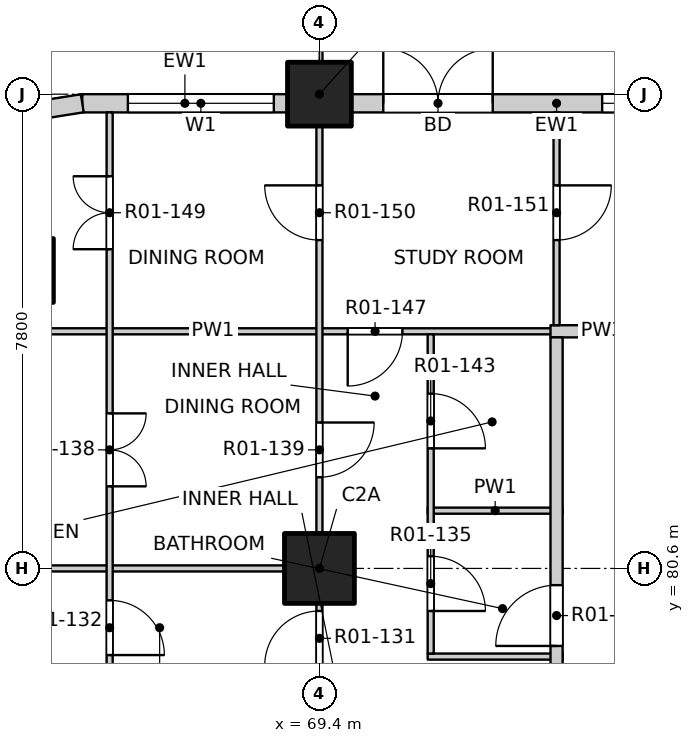
"""IFC4 building model, lengths in metres.
Left out: names, types, materials, properties, quantities, classifications, styles, units other than length and angle.
Written with IfcOpenShell. Run it as: python <this file> out.ifc"""

import sys

from ifc_helpers import new_model, si_unit, direction, frame, frame_2d, origin, origin_2d, place, context, subcontext, project, spatial, rectangle, extrude, element, fill, save


model = new_model("IFC4")
c1 = context("Model", 3, precision=1e-05, world=origin(), true_north=direction((0.0, 1.0)))
c2 = subcontext(c1, "Body", "Model", "MODEL_VIEW")
j1 = project(units=[si_unit("LENGTHUNIT", "METRE"), si_unit("PLANEANGLEUNIT", "RADIAN")], contexts=[c1])
p1 = place(None, origin())
s1 = spatial("IfcSite", under=j1, at=p1, CompositionType="ELEMENT")
p2 = place(p1, origin())
s2 = spatial("IfcBuilding", under=s1, at=p2, CompositionType="ELEMENT")
p3 = place(p2, frame((0.0, 0.0, 26.3)))
s3 = spatial("IfcBuildingStorey", under=s2, at=p3, CompositionType="ELEMENT", Elevation=26.3)
for number, where, z_axis, x_axis in (
    (1, (64.5, 85.5, -0.25), (0.0, 0.0, 1.0), (1.0, 0.0, 0.0)),
    (2, (69.4, 88.4, -0.25), (0.0, 0.0, 1.0), (1.0, 0.0, 0.0)),
):
    element("IfcColumn", number, at=place(p3, frame(where, z_axis=z_axis, x_axis=x_axis)), inside=s3, PredefinedType="COLUMN", context=c2, shape_type="SweptSolid", body=[
        extrude(rectangle(XDim=1.05, YDim=1.05, at=origin_2d()), origin(), (0.0, 0.0, 1.0), 3.4),
    ])
p4 = place(p3, frame((69.4, 80.6, -0.25), z_axis=(0.0, 0.0, 1.0), x_axis=(1.0, 0.0, 0.0)))
e3 = element("IfcColumn", 3, at=p4, inside=s3, PredefinedType="COLUMN", context=c2, shape_type="SweptSolid", body=[
    extrude(rectangle(XDim=1.15, YDim=1.15, at=origin_2d()), origin(), (0.0, 0.0, 1.0), 3.4),
])
p5 = place(p3, frame((65.5, 88.25, 0.0), z_axis=(0.0, 0.0, 1.0), x_axis=(1.0, 0.0, 0.0)))
e4 = element("IfcWall", 4, at=p5, inside=s3, PredefinedType="SOLIDWALL", context=c2, shape_type="SweptSolid", body=[
    extrude(rectangle(XDim=3.375, YDim=0.3, at=frame_2d((1.688, 0.0))), origin(), (0.0, 0.0, 1.0), 2.7),
])
p6 = place(p5, frame((0.75, 0.0, 0.9)))
e5 = element("IfcOpeningElement", 5, at=p6, cuts=e4, PredefinedType="OPENING", context=c2, shape_type="SweptSolid", body=[
    extrude(rectangle(XDim=2.4, YDim=1.8, at=frame_2d((1.2, 0.9))), frame((0.0, 0.16, 0.0), z_axis=(0.0, -1.0, 0.0), x_axis=(1.0, 0.0, 0.0)), (0.0, 0.0, 1.0), 0.32),
])
p7 = place(p3, frame((69.925, 88.25, 0.0), z_axis=(0.0, 0.0, 1.0), x_axis=(1.0, 0.0, 0.0)))
e6 = element("IfcWall", 6, at=p7, inside=s3, PredefinedType="SOLIDWALL", context=c2, shape_type="SweptSolid", body=[
    extrude(rectangle(XDim=6.75, YDim=0.3, at=frame_2d((3.375, 0.0))), origin(), (0.0, 0.0, 1.0), 2.7),
])
p8 = place(p7, frame((0.525, 0.0, 0.0)))
e7 = element("IfcOpeningElement", 7, at=p8, cuts=e6, PredefinedType="OPENING", context=c2, shape_type="SweptSolid", body=[
    extrude(rectangle(XDim=1.8, YDim=2.4, at=frame_2d((0.9, 1.2))), frame((0.0, 0.16, 0.0), z_axis=(0.0, -1.0, 0.0), x_axis=(1.0, 0.0, 0.0)), (0.0, 0.0, 1.0), 0.32),
])
p9 = place(p7, frame((4.125, 0.0, 0.9)))
e8 = element("IfcOpeningElement", 8, at=p9, cuts=e6, PredefinedType="OPENING", context=c2, shape_type="SweptSolid", body=[
    extrude(rectangle(XDim=2.4, YDim=1.8, at=frame_2d((1.2, 0.9))), frame((0.0, 0.16, 0.0), z_axis=(0.0, -1.0, 0.0), x_axis=(1.0, 0.0, 0.0)), (0.0, 0.0, 1.0), 0.32),
])
p10 = place(p3, frame((65.5, 88.25, 0.0), z_axis=(0.0, 0.0, 1.0), x_axis=(-0.987678452879, -0.156496880861, 0.0)))
e9 = element("IfcWall", 9, at=p10, inside=s3, PredefinedType="SOLIDWALL", context=c2, shape_type="SweptSolid", body=[
    extrude(rectangle(XDim=1.173, YDim=0.3, at=frame_2d((0.586, 0.0))), origin(), (0.0, 0.0, 1.0), 2.7),
])
p11 = place(p3, frame((71.18, 79.15, 0.0), z_axis=(0.0, 0.0, 1.0), x_axis=(1.0, 0.0, 0.0)))
e10 = element("IfcWall", 10, at=p11, inside=s3, PredefinedType="PARTITIONING", context=c2, shape_type="SweptSolid", body=[
    extrude(rectangle(XDim=2.22, YDim=0.1, at=frame_2d((1.11, 0.0))), origin(), (0.0, 0.0, 1.0), 3.15),
])
p12 = place(p3, frame((61.9, 80.6, 0.0), z_axis=(0.0, 0.0, 1.0), x_axis=(1.0, 0.0, 0.0)))
e11 = element("IfcWall", 11, at=p12, inside=s3, PredefinedType="PARTITIONING", context=c2, shape_type="SweptSolid", body=[
    extrude(rectangle(XDim=7.55, YDim=0.1, at=frame_2d((3.775, 0.0))), origin(), (0.0, 0.0, 1.0), 2.55),
])
p13 = place(p3, frame((71.18, 81.55, 0.0), z_axis=(0.0, 0.0, 1.0), x_axis=(1.0, 0.0, 0.0)))
e12 = element("IfcWall", 12, at=p13, inside=s3, PredefinedType="PARTITIONING", context=c2, shape_type="SweptSolid", body=[
    extrude(rectangle(XDim=2.22, YDim=0.1, at=frame_2d((1.11, 0.0))), origin(), (0.0, 0.0, 1.0), 3.15),
])
p14 = place(p3, frame((61.9, 84.5, 0.0), z_axis=(0.0, 0.0, 1.0), x_axis=(1.0, 0.0, 0.0)))
e13 = element("IfcWall", 13, at=p14, inside=s3, PredefinedType="PARTITIONING", context=c2, shape_type="SweptSolid", body=[
    extrude(rectangle(XDim=11.5, YDim=0.1, at=frame_2d((5.75, 0.0))), origin(), (0.0, 0.0, 1.0), 3.15),
])
p15 = place(p14, frame((7.965, 0.0, 0.0)))
e14 = element("IfcOpeningElement", 14, at=p15, cuts=e13, PredefinedType="OPENING", context=c2, shape_type="SweptSolid", body=[
    extrude(rectangle(XDim=0.9, YDim=2.1, at=frame_2d((0.45, 1.05))), frame((0.0, 0.06, 0.0), z_axis=(0.0, -1.0, 0.0), x_axis=(1.0, 0.0, 0.0)), (0.0, 0.0, 1.0), 0.12),
])
p16 = place(p3, frame((73.2, 84.5, 0.0), z_axis=(0.0, 0.0, 1.0), x_axis=(1.0, 0.0, 0.0)))
e15 = element("IfcWall", 15, at=p16, inside=s3, PredefinedType="PARTITIONING", context=c2, shape_type="SweptSolid", body=[
    extrude(rectangle(XDim=1.7, YDim=0.2, at=frame_2d((0.85, 0.0))), origin(), (0.0, 0.0, 1.0), 3.15),
])
p17 = place(p3, frame((65.95, 76.8, 0.0), z_axis=(0.0, 0.0, 1.0), x_axis=(0.0, 1.0, 0.0)))
e16 = element("IfcWall", 16, at=p17, inside=s3, PredefinedType="PARTITIONING", context=c2, shape_type="SweptSolid", body=[
    extrude(rectangle(XDim=11.3, YDim=0.1, at=frame_2d((5.65, 0.0))), origin(), (0.0, 0.0, 1.0), 3.15),
])
p18 = place(p17, frame((0.425, 0.0, 0.0)))
e17 = element("IfcOpeningElement", 17, at=p18, cuts=e16, PredefinedType="OPENING", context=c2, shape_type="SweptSolid", body=[
    extrude(rectangle(XDim=0.9, YDim=2.1, at=frame_2d((0.45, 1.05))), frame((0.0, 0.06, 0.0), z_axis=(0.0, -1.0, 0.0), x_axis=(1.0, 0.0, 0.0)), (0.0, 0.0, 1.0), 0.12),
])
p19 = place(p17, frame((2.375, 0.0, 0.0)))
e18 = element("IfcOpeningElement", 18, at=p19, cuts=e16, PredefinedType="OPENING", context=c2, shape_type="SweptSolid", body=[
    extrude(rectangle(XDim=0.9, YDim=2.1, at=frame_2d((0.45, 1.05))), frame((0.0, 0.06, 0.0), z_axis=(0.0, -1.0, 0.0), x_axis=(1.0, 0.0, 0.0)), (0.0, 0.0, 1.0), 0.12),
])
p20 = place(p17, frame((5.15, 0.0, 0.0)))
e19 = element("IfcOpeningElement", 19, at=p20, cuts=e16, PredefinedType="OPENING", context=c2, shape_type="SweptSolid", body=[
    extrude(rectangle(XDim=1.2, YDim=2.1, at=frame_2d((0.6, 1.05))), frame((0.0, 0.06, 0.0), z_axis=(0.0, -1.0, 0.0), x_axis=(1.0, 0.0, 0.0)), (0.0, 0.0, 1.0), 0.12),
])
p21 = place(p17, frame((9.05, 0.0, 0.0)))
e20 = element("IfcOpeningElement", 20, at=p21, cuts=e16, PredefinedType="OPENING", context=c2, shape_type="SweptSolid", body=[
    extrude(rectangle(XDim=1.2, YDim=2.1, at=frame_2d((0.6, 1.05))), frame((0.0, 0.06, 0.0), z_axis=(0.0, -1.0, 0.0), x_axis=(1.0, 0.0, 0.0)), (0.0, 0.0, 1.0), 0.12),
])
p22 = place(p3, frame((69.4, 49.4, 0.0), z_axis=(0.0, 0.0, 1.0), x_axis=(0.0, 1.0, 0.0)))
e21 = element("IfcWall", 21, at=p22, inside=s3, PredefinedType="PARTITIONING", context=c2, shape_type="SweptSolid", body=[
    extrude(rectangle(XDim=31.2, YDim=0.1, at=frame_2d((15.6, 0.0))), origin(), (0.0, 0.0, 1.0), 3.15),
])
p23 = place(p22, frame((1.5, 0.0, 0.0)))
e22 = element("IfcOpeningElement", 22, at=p23, cuts=e21, PredefinedType="OPENING", context=c2, shape_type="SweptSolid", body=[
    extrude(rectangle(XDim=0.9, YDim=2.1, at=frame_2d((0.45, 1.05))), frame((0.0, 0.06, 0.0), z_axis=(0.0, -1.0, 0.0), x_axis=(1.0, 0.0, 0.0)), (0.0, 0.0, 1.0), 0.12),
])
p24 = place(p22, frame((6.225, 0.0, 0.0)))
e23 = element("IfcOpeningElement", 23, at=p24, cuts=e21, PredefinedType="OPENING", context=c2, shape_type="SweptSolid", body=[
    extrude(rectangle(XDim=0.9, YDim=2.1, at=frame_2d((0.45, 1.05))), frame((0.0, 0.06, 0.0), z_axis=(0.0, -1.0, 0.0), x_axis=(1.0, 0.0, 0.0)), (0.0, 0.0, 1.0), 0.12),
])
p25 = place(p22, frame((10.275, 0.0, 0.0)))
e24 = element("IfcOpeningElement", 24, at=p25, cuts=e21, PredefinedType="OPENING", context=c2, shape_type="SweptSolid", body=[
    extrude(rectangle(XDim=0.9, YDim=2.1, at=frame_2d((0.45, 1.05))), frame((0.0, 0.06, 0.0), z_axis=(0.0, -1.0, 0.0), x_axis=(1.0, 0.0, 0.0)), (0.0, 0.0, 1.0), 0.12),
])
p26 = place(p22, frame((13.2, 0.0, 0.0)))
e25 = element("IfcOpeningElement", 25, at=p26, cuts=e21, PredefinedType="OPENING", context=c2, shape_type="SweptSolid", body=[
    extrude(rectangle(XDim=0.9, YDim=2.1, at=frame_2d((0.45, 1.05))), frame((0.0, 0.06, 0.0), z_axis=(0.0, -1.0, 0.0), x_axis=(1.0, 0.0, 0.0)), (0.0, 0.0, 1.0), 0.12),
])
p27 = place(p22, frame((18.075, 0.0, 0.0)))
e26 = element("IfcOpeningElement", 26, at=p27, cuts=e21, PredefinedType="OPENING", context=c2, shape_type="SweptSolid", body=[
    extrude(rectangle(XDim=0.9, YDim=2.1, at=frame_2d((0.45, 1.05))), frame((0.0, 0.06, 0.0), z_axis=(0.0, -1.0, 0.0), x_axis=(1.0, 0.0, 0.0)), (0.0, 0.0, 1.0), 0.12),
])
p28 = place(p22, frame((21.8, 0.0, 0.0)))
e27 = element("IfcOpeningElement", 27, at=p28, cuts=e21, PredefinedType="OPENING", context=c2, shape_type="SweptSolid", body=[
    extrude(rectangle(XDim=0.9, YDim=2.1, at=frame_2d((0.45, 1.05))), frame((0.0, 0.06, 0.0), z_axis=(0.0, -1.0, 0.0), x_axis=(1.0, 0.0, 0.0)), (0.0, 0.0, 1.0), 0.12),
])
p29 = place(p22, frame((24.9, 0.0, 0.0)))
e28 = element("IfcOpeningElement", 28, at=p29, cuts=e21, PredefinedType="OPENING", context=c2, shape_type="SweptSolid", body=[
    extrude(rectangle(XDim=0.9, YDim=2.1, at=frame_2d((0.45, 1.05))), frame((0.0, 0.06, 0.0), z_axis=(0.0, -1.0, 0.0), x_axis=(1.0, 0.0, 0.0)), (0.0, 0.0, 1.0), 0.12),
])
p30 = place(p22, frame((29.6, 0.0, 0.0)))
e29 = element("IfcOpeningElement", 29, at=p30, cuts=e21, PredefinedType="OPENING", context=c2, shape_type="SweptSolid", body=[
    extrude(rectangle(XDim=0.9, YDim=2.1, at=frame_2d((0.45, 1.05))), frame((0.0, 0.06, 0.0), z_axis=(0.0, -1.0, 0.0), x_axis=(1.0, 0.0, 0.0)), (0.0, 0.0, 1.0), 0.12),
])
p31 = place(p3, frame((69.4, 80.6, 0.0), z_axis=(0.0, 0.0, 1.0), x_axis=(0.0, 1.0, 0.0)))
e30 = element("IfcWall", 30, at=p31, inside=s3, PredefinedType="PARTITIONING", context=c2, shape_type="SweptSolid", body=[
    extrude(rectangle(XDim=7.5, YDim=0.1, at=frame_2d((3.75, 0.0))), origin(), (0.0, 0.0, 1.0), 2.55),
])
p32 = place(p31, frame((1.5, 0.0, 0.0)))
e31 = element("IfcOpeningElement", 31, at=p32, cuts=e30, PredefinedType="OPENING", context=c2, shape_type="SweptSolid", body=[
    extrude(rectangle(XDim=0.9, YDim=2.1, at=frame_2d((0.45, 1.05))), frame((0.0, 0.06, 0.0), z_axis=(0.0, -1.0, 0.0), x_axis=(1.0, 0.0, 0.0)), (0.0, 0.0, 1.0), 0.12),
])
p33 = place(p31, frame((5.4, 0.0, 0.0)))
e32 = element("IfcOpeningElement", 32, at=p33, cuts=e30, PredefinedType="OPENING", context=c2, shape_type="SweptSolid", body=[
    extrude(rectangle(XDim=0.9, YDim=2.1, at=frame_2d((0.45, 1.05))), frame((0.0, 0.06, 0.0), z_axis=(0.0, -1.0, 0.0), x_axis=(1.0, 0.0, 0.0)), (0.0, 0.0, 1.0), 0.12),
])
p34 = place(p3, frame((71.23, 79.2, 0.0), z_axis=(0.0, 0.0, 1.0), x_axis=(0.0, 1.0, 0.0)))
e33 = element("IfcWall", 33, at=p34, inside=s3, PredefinedType="PARTITIONING", context=c2, shape_type="SweptSolid", body=[
    extrude(rectangle(XDim=5.25, YDim=0.1, at=frame_2d((2.625, 0.0))), origin(), (0.0, 0.0, 1.0), 3.15),
])
p35 = place(p34, frame((0.7, 0.0, 0.0)))
e34 = element("IfcOpeningElement", 34, at=p35, cuts=e33, PredefinedType="OPENING", context=c2, shape_type="SweptSolid", body=[
    extrude(rectangle(XDim=0.9, YDim=2.1, at=frame_2d((0.45, 1.05))), frame((0.0, 0.06, 0.0), z_axis=(0.0, -1.0, 0.0), x_axis=(1.0, 0.0, 0.0)), (0.0, 0.0, 1.0), 0.12),
])
p36 = place(p34, frame((3.375, 0.0, 0.0)))
e35 = element("IfcOpeningElement", 35, at=p36, cuts=e33, PredefinedType="OPENING", context=c2, shape_type="SweptSolid", body=[
    extrude(rectangle(XDim=0.9, YDim=2.1, at=frame_2d((0.45, 1.05))), frame((0.0, 0.06, 0.0), z_axis=(0.0, -1.0, 0.0), x_axis=(1.0, 0.0, 0.0)), (0.0, 0.0, 1.0), 0.12),
])
p37 = place(p3, frame((73.3, 53.4, 0.0), z_axis=(0.0, 0.0, 1.0), x_axis=(0.0, 1.0, 0.0)))
e36 = element("IfcWall", 36, at=p37, inside=s3, PredefinedType="PARTITIONING", context=c2, shape_type="SweptSolid", body=[
    extrude(rectangle(XDim=31.0, YDim=0.2, at=frame_2d((15.5, 0.0))), origin(), (0.0, 0.0, 1.0), 3.15),
])
p38 = place(p37, frame((2.325, 0.0, 0.0)))
e37 = element("IfcOpeningElement", 37, at=p38, cuts=e36, PredefinedType="OPENING", context=c2, shape_type="SweptSolid", body=[
    extrude(rectangle(XDim=1.0, YDim=2.1, at=frame_2d((0.5, 1.05))), frame((0.0, 0.11, 0.0), z_axis=(0.0, -1.0, 0.0), x_axis=(1.0, 0.0, 0.0)), (0.0, 0.0, 1.0), 0.22),
])
p39 = place(p37, frame((10.725, 0.0, 0.0)))
e38 = element("IfcOpeningElement", 38, at=p39, cuts=e36, PredefinedType="OPENING", context=c2, shape_type="SweptSolid", body=[
    extrude(rectangle(XDim=1.0, YDim=2.1, at=frame_2d((0.5, 1.05))), frame((0.0, 0.11, 0.0), z_axis=(0.0, -1.0, 0.0), x_axis=(1.0, 0.0, 0.0)), (0.0, 0.0, 1.0), 0.22),
])
p40 = place(p37, frame((18.225, 0.0, 0.0)))
e39 = element("IfcOpeningElement", 39, at=p40, cuts=e36, PredefinedType="OPENING", context=c2, shape_type="SweptSolid", body=[
    extrude(rectangle(XDim=1.0, YDim=2.1, at=frame_2d((0.5, 1.05))), frame((0.0, 0.11, 0.0), z_axis=(0.0, -1.0, 0.0), x_axis=(1.0, 0.0, 0.0)), (0.0, 0.0, 1.0), 0.22),
])
p41 = place(p37, frame((25.925, 0.0, 0.0)))
e40 = element("IfcOpeningElement", 40, at=p41, cuts=e36, PredefinedType="OPENING", context=c2, shape_type="SweptSolid", body=[
    extrude(rectangle(XDim=1.0, YDim=2.1, at=frame_2d((0.5, 1.05))), frame((0.0, 0.11, 0.0), z_axis=(0.0, -1.0, 0.0), x_axis=(1.0, 0.0, 0.0)), (0.0, 0.0, 1.0), 0.22),
])
p42 = place(p3, frame((73.3, 84.6, 0.0), z_axis=(0.0, 0.0, 1.0), x_axis=(0.0, 1.0, 0.0)))
e41 = element("IfcWall", 41, at=p42, inside=s3, PredefinedType="PARTITIONING", context=c2, shape_type="SweptSolid", body=[
    extrude(rectangle(XDim=3.5, YDim=0.1, at=frame_2d((1.75, 0.0))), origin(), (0.0, 0.0, 1.0), 3.15),
])
p43 = place(p42, frame((1.4, 0.0, 0.0)))
e42 = element("IfcOpeningElement", 42, at=p43, cuts=e41, PredefinedType="OPENING", context=c2, shape_type="SweptSolid", body=[
    extrude(rectangle(XDim=0.9, YDim=2.1, at=frame_2d((0.45, 1.05))), frame((0.0, 0.06, 0.0), z_axis=(0.0, -1.0, 0.0), x_axis=(1.0, 0.0, 0.0)), (0.0, 0.0, 1.0), 0.12),
])
p44 = place(p6, origin())
e43 = element("IfcWindow", 43, at=p44, inside=s3, PartitioningType="DOUBLE_PANEL_VERTICAL", PredefinedType="WINDOW", context=c2, shape_type="SweptSolid", body=[
    extrude(rectangle(XDim=2.4, YDim=1.8, at=frame_2d((1.2, 0.9))), frame((0.0, 0.03, 0.0), z_axis=(0.0, -1.0, 0.0), x_axis=(1.0, 0.0, 0.0)), (0.0, 0.0, 1.0), 0.06),
])
fill(e5, e43)
p45 = place(p8, origin())
e44 = element("IfcDoor", 44, at=p45, inside=s3, OperationType="DOUBLE_DOOR_SINGLE_SWING", PredefinedType="DOOR", context=c2, shape_type="SweptSolid", body=[
    extrude(rectangle(XDim=1.8, YDim=2.4, at=frame_2d((0.9, 1.2))), frame((0.0, 0.025, 0.0), z_axis=(0.0, -1.0, 0.0), x_axis=(1.0, 0.0, 0.0)), (0.0, 0.0, 1.0), 0.05),
])
fill(e7, e44)
p46 = place(p9, origin())
e45 = element("IfcWindow", 45, at=p46, inside=s3, PartitioningType="DOUBLE_PANEL_VERTICAL", PredefinedType="WINDOW", context=c2, shape_type="SweptSolid", body=[
    extrude(rectangle(XDim=2.4, YDim=1.8, at=frame_2d((1.2, 0.9))), frame((0.0, 0.03, 0.0), z_axis=(0.0, -1.0, 0.0), x_axis=(1.0, 0.0, 0.0)), (0.0, 0.0, 1.0), 0.06),
])
fill(e8, e45)
p47 = place(p30, origin())
e46 = element("IfcDoor", 46, at=p47, inside=s3, OperationType="SINGLE_SWING_LEFT", PredefinedType="DOOR", context=c2, shape_type="SweptSolid", body=[
    extrude(rectangle(XDim=0.9, YDim=2.1, at=frame_2d((0.45, 1.05))), frame((0.0, 0.025, 0.0), z_axis=(0.0, -1.0, 0.0), x_axis=(1.0, 0.0, 0.0)), (0.0, 0.0, 1.0), 0.05),
])
fill(e29, e46)
p48 = place(p19, origin())
e47 = element("IfcDoor", 47, at=p48, inside=s3, OperationType="SINGLE_SWING_RIGHT", PredefinedType="DOOR", context=c2, shape_type="SweptSolid", body=[
    extrude(rectangle(XDim=0.9, YDim=2.1, at=frame_2d((0.45, 1.05))), frame((0.0, 0.025, 0.0), z_axis=(0.0, -1.0, 0.0), x_axis=(1.0, 0.0, 0.0)), (0.0, 0.0, 1.0), 0.05),
])
fill(e18, e47)
p49 = place(p41, origin())
e48 = element("IfcDoor", 48, at=p49, inside=s3, OperationType="SINGLE_SWING_RIGHT", PredefinedType="DOOR", context=c2, shape_type="SweptSolid", body=[
    extrude(rectangle(XDim=1.0, YDim=2.1, at=frame_2d((0.5, 1.05))), frame((0.0, 0.025, 0.0), z_axis=(0.0, -1.0, 0.0), x_axis=(1.0, 0.0, 0.0)), (0.0, 0.0, 1.0), 0.05),
])
fill(e40, e48)
p50 = place(p35, origin())
e49 = element("IfcDoor", 49, at=p50, inside=s3, OperationType="SINGLE_SWING_RIGHT", PredefinedType="DOOR", context=c2, shape_type="SweptSolid", body=[
    extrude(rectangle(XDim=0.9, YDim=2.1, at=frame_2d((0.45, 1.05))), frame((0.0, 0.025, 0.0), z_axis=(0.0, -1.0, 0.0), x_axis=(1.0, 0.0, 0.0)), (0.0, 0.0, 1.0), 0.05),
])
fill(e34, e49)
p51 = place(p20, origin())
e50 = element("IfcDoor", 50, at=p51, inside=s3, OperationType="DOUBLE_DOOR_SINGLE_SWING", PredefinedType="DOOR", context=c2, shape_type="SweptSolid", body=[
    extrude(rectangle(XDim=1.2, YDim=2.1, at=frame_2d((0.6, 1.05))), frame((0.0, 0.025, 0.0), z_axis=(0.0, -1.0, 0.0), x_axis=(1.0, 0.0, 0.0)), (0.0, 0.0, 1.0), 0.05),
])
fill(e19, e50)
p52 = place(p32, origin())
e51 = element("IfcDoor", 51, at=p52, inside=s3, OperationType="SINGLE_SWING_LEFT", PredefinedType="DOOR", context=c2, shape_type="SweptSolid", body=[
    extrude(rectangle(XDim=0.9, YDim=2.1, at=frame_2d((0.45, 1.05))), frame((0.0, 0.025, 0.0), z_axis=(0.0, -1.0, 0.0), x_axis=(1.0, 0.0, 0.0)), (0.0, 0.0, 1.0), 0.05),
])
fill(e31, e51)
p53 = place(p36, origin())
e52 = element("IfcDoor", 52, at=p53, inside=s3, OperationType="SINGLE_SWING_RIGHT", PredefinedType="DOOR", context=c2, shape_type="SweptSolid", body=[
    extrude(rectangle(XDim=0.9, YDim=2.1, at=frame_2d((0.45, 1.05))), frame((0.0, 0.025, 0.0), z_axis=(0.0, -1.0, 0.0), x_axis=(1.0, 0.0, 0.0)), (0.0, 0.0, 1.0), 0.05),
])
fill(e35, e52)
p54 = place(p15, origin())
e53 = element("IfcDoor", 53, at=p54, inside=s3, OperationType="SINGLE_SWING_RIGHT", PredefinedType="DOOR", context=c2, shape_type="SweptSolid", body=[
    extrude(rectangle(XDim=0.9, YDim=2.1, at=frame_2d((0.45, 1.05))), frame((0.0, 0.025, 0.0), z_axis=(0.0, -1.0, 0.0), x_axis=(1.0, 0.0, 0.0)), (0.0, 0.0, 1.0), 0.05),
])
fill(e14, e53)
p55 = place(p21, origin())
e54 = element("IfcDoor", 54, at=p55, inside=s3, OperationType="DOUBLE_DOOR_SINGLE_SWING", PredefinedType="DOOR", context=c2, shape_type="SweptSolid", body=[
    extrude(rectangle(XDim=1.2, YDim=2.1, at=frame_2d((0.6, 1.05))), frame((0.0, 0.025, 0.0), z_axis=(0.0, -1.0, 0.0), x_axis=(1.0, 0.0, 0.0)), (0.0, 0.0, 1.0), 0.05),
])
fill(e20, e54)
p56 = place(p33, origin())
e55 = element("IfcDoor", 55, at=p56, inside=s3, OperationType="SINGLE_SWING_RIGHT", PredefinedType="DOOR", context=c2, shape_type="SweptSolid", body=[
    extrude(rectangle(XDim=0.9, YDim=2.1, at=frame_2d((0.45, 1.05))), frame((0.0, 0.025, 0.0), z_axis=(0.0, -1.0, 0.0), x_axis=(1.0, 0.0, 0.0)), (0.0, 0.0, 1.0), 0.05),
])
fill(e32, e55)
p57 = place(p43, origin())
e56 = element("IfcDoor", 56, at=p57, inside=s3, OperationType="SINGLE_SWING_LEFT", PredefinedType="DOOR", context=c2, shape_type="SweptSolid", body=[
    extrude(rectangle(XDim=0.9, YDim=2.1, at=frame_2d((0.45, 1.05))), frame((0.0, 0.025, 0.0), z_axis=(0.0, -1.0, 0.0), x_axis=(1.0, 0.0, 0.0)), (0.0, 0.0, 1.0), 0.05),
])
fill(e42, e56)
save(model, sys.argv[1])
